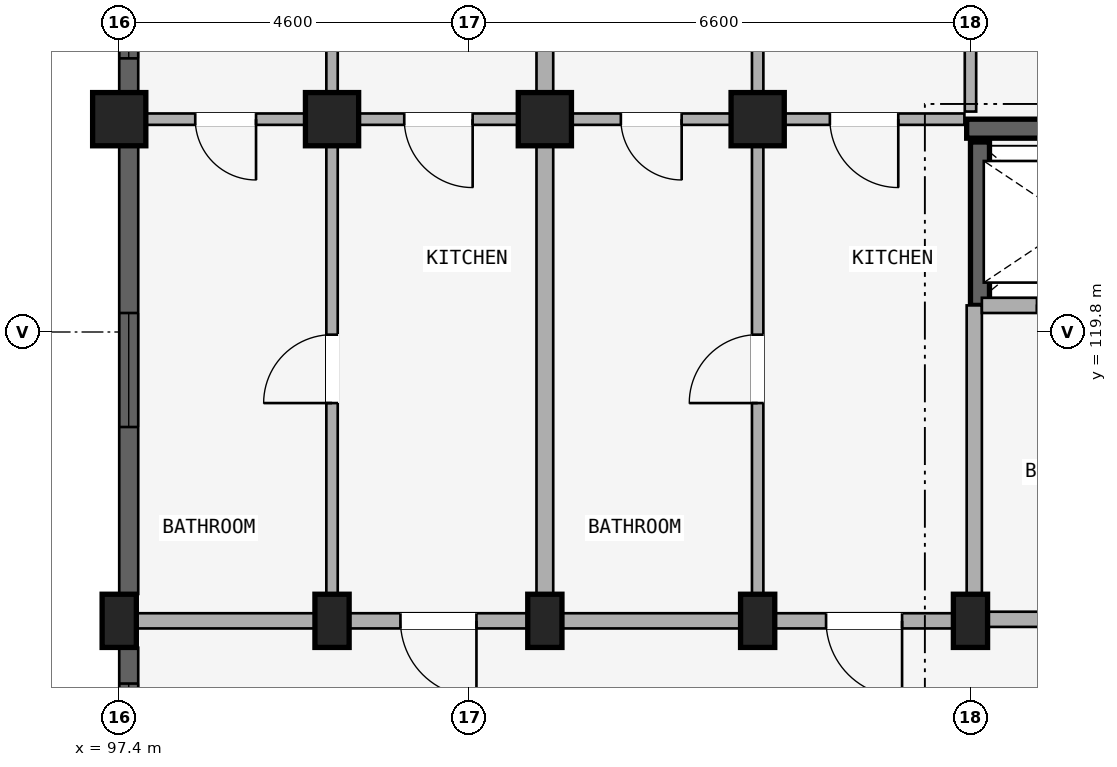
"""IFC4 building model, lengths in metres.
Left out: names, types, materials, properties, quantities, classifications, styles, units other than length and angle.
Written with IfcOpenShell. Run it as: python <this file> out.ifc"""

import sys

from ifc_helpers import new_model, si_unit, direction, frame, frame_2d, origin, origin_2d, place, context, subcontext, project, spatial, rectangle, extrude, element, fill, save


model = new_model("IFC4")
c1 = context("Model", 3, precision=1e-05, world=origin(), true_north=direction((0.0, 1.0)))
c2 = subcontext(c1, "Body", "Model", "MODEL_VIEW")
j1 = project(units=[si_unit("LENGTHUNIT", "METRE"), si_unit("PLANEANGLEUNIT", "RADIAN")], contexts=[c1])
p1 = place(None, origin())
s1 = spatial("IfcSite", under=j1, at=p1, CompositionType="ELEMENT")
p2 = place(p1, origin())
s2 = spatial("IfcBuilding", under=s1, at=p2, CompositionType="ELEMENT")
p3 = place(p2, frame((0.0, 0.0, 18.15)))
s3 = spatial("IfcBuildingStorey", under=s2, at=p3, CompositionType="ELEMENT", Elevation=18.15)
p4 = place(p3, frame((111.35, 122.475, 0.0), z_axis=(0.0, 0.0, 1.0), x_axis=(-1.0, 0.0, 0.0)))
e1 = element("IfcWall", 1, at=p4, inside=s3, PredefinedType="SHEAR", context=c2, shape_type="SweptSolid", body=[
    extrude(rectangle(XDim=2.8, YDim=0.25, at=frame_2d((1.4, 0.0))), origin(), (0.0, 0.0, 1.0), 2.93),
])
p5 = place(p3, frame((108.725, 120.15, 0.0), z_axis=(0.0, 0.0, 1.0), x_axis=(0.0, 1.0, 0.0)))
e2 = element("IfcWall", 2, at=p5, inside=s3, PredefinedType="SHEAR", context=c2, shape_type="SweptSolid", body=[
    extrude(rectangle(XDim=2.15, YDim=0.25, at=frame_2d((1.075, 0.0))), origin(), (0.0, 0.0, 1.0), 2.93),
])
for number, where, z_axis, x_axis in (
    (3, (108.6, 116.0, 0.0), (0.0, 0.0, 1.0), (1.0, 0.0, 0.0)),
    (4, (105.8, 116.0, 0.0), (0.0, 0.0, 1.0), (1.0, 0.0, 0.0)),
):
    element("IfcColumn", number, at=place(p3, frame(where, z_axis=z_axis, x_axis=x_axis)), inside=s3, PredefinedType="COLUMN", context=c2, shape_type="SweptSolid", body=[
        extrude(rectangle(XDim=0.45, YDim=0.7, at=origin_2d()), origin(), (0.0, 0.0, 1.0), 2.93),
    ])
p6 = place(p3, frame((105.8, 122.6, 0.0), z_axis=(0.0, 0.0, 1.0), x_axis=(1.0, 0.0, 0.0)))
e5 = element("IfcColumn", 5, at=p6, inside=s3, PredefinedType="COLUMN", context=c2, shape_type="SweptSolid", body=[
    extrude(rectangle(XDim=0.7, YDim=0.7, at=origin_2d()), origin(), (0.0, 0.0, 1.0), 2.93),
])
p7 = place(p3, frame((103.0, 116.0, 0.0), z_axis=(0.0, 0.0, 1.0), x_axis=(1.0, 0.0, 0.0)))
e6 = element("IfcColumn", 6, at=p7, inside=s3, PredefinedType="COLUMN", context=c2, shape_type="SweptSolid", body=[
    extrude(rectangle(XDim=0.45, YDim=0.7, at=origin_2d()), origin(), (0.0, 0.0, 1.0), 2.93),
])
p8 = place(p3, frame((103.0, 122.6, 0.0), z_axis=(0.0, 0.0, 1.0), x_axis=(1.0, 0.0, 0.0)))
e7 = element("IfcColumn", 7, at=p8, inside=s3, PredefinedType="COLUMN", context=c2, shape_type="SweptSolid", body=[
    extrude(rectangle(XDim=0.7, YDim=0.7, at=origin_2d()), origin(), (0.0, 0.0, 1.0), 2.93),
])
p9 = place(p3, frame((100.2, 116.0, 0.0), z_axis=(0.0, 0.0, 1.0), x_axis=(1.0, 0.0, 0.0)))
e8 = element("IfcColumn", 8, at=p9, inside=s3, PredefinedType="COLUMN", context=c2, shape_type="SweptSolid", body=[
    extrude(rectangle(XDim=0.45, YDim=0.7, at=origin_2d()), origin(), (0.0, 0.0, 1.0), 2.93),
])
p10 = place(p3, frame((100.2, 122.6, 0.0), z_axis=(0.0, 0.0, 1.0), x_axis=(1.0, 0.0, 0.0)))
e9 = element("IfcColumn", 9, at=p10, inside=s3, PredefinedType="COLUMN", context=c2, shape_type="SweptSolid", body=[
    extrude(rectangle(XDim=0.7, YDim=0.7, at=origin_2d()), origin(), (0.0, 0.0, 1.0), 2.93),
])
p11 = place(p3, frame((97.4, 116.0, 0.0), z_axis=(0.0, 0.0, 1.0), x_axis=(1.0, 0.0, 0.0)))
e10 = element("IfcColumn", 10, at=p11, inside=s3, PredefinedType="COLUMN", context=c2, shape_type="SweptSolid", body=[
    extrude(rectangle(XDim=0.45, YDim=0.7, at=origin_2d()), origin(), (0.0, 0.0, 1.0), 2.93),
])
p12 = place(p3, frame((97.4, 122.6, 0.0), z_axis=(0.0, 0.0, 1.0), x_axis=(1.0, 0.0, 0.0)))
e11 = element("IfcColumn", 11, at=p12, inside=s3, PredefinedType="COLUMN", context=c2, shape_type="SweptSolid", body=[
    extrude(rectangle(XDim=0.7, YDim=0.7, at=origin_2d()), origin(), (0.0, 0.0, 1.0), 2.93),
])
p13 = place(p3, frame((114.3, 116.02, 0.0), z_axis=(0.0, 0.0, 1.0), x_axis=(-1.0, 0.0, 0.0)))
e12 = element("IfcWall", 12, at=p13, inside=s3, PredefinedType="STANDARD", context=c2, shape_type="SweptSolid", body=[
    extrude(rectangle(XDim=5.65, YDim=0.2, at=frame_2d((2.825, 0.0))), origin(), (0.0, 0.0, 1.0), 2.372),
])
p14 = place(p13, frame((1.923, 0.0, 0.0)))
e13 = element("IfcOpeningElement", 13, at=p14, cuts=e12, PredefinedType="OPENING", context=c2, shape_type="SweptSolid", body=[
    extrude(rectangle(XDim=1.24, YDim=2.15, at=frame_2d((0.62, 1.075))), frame((0.0, 0.11, 0.0), z_axis=(0.0, -1.0, 0.0), x_axis=(1.0, 0.0, 0.0)), (0.0, 0.0, 1.0), 0.22),
])
p15 = place(p3, frame((108.65, 116.02, 0.0), z_axis=(0.0, 0.0, 1.0), x_axis=(0.0, 1.0, 0.0)))
e14 = element("IfcWall", 14, at=p15, inside=s3, PredefinedType="STANDARD", context=c2, shape_type="SweptSolid", body=[
    extrude(rectangle(XDim=4.13, YDim=0.2, at=frame_2d((2.065, 0.0))), origin(), (0.0, 0.0, 1.0), 2.372),
])
p16 = place(p3, frame((111.3, 120.15, 0.0), z_axis=(0.0, 0.0, 1.0), x_axis=(-1.0, 0.0, 0.0)))
e15 = element("IfcWall", 15, at=p16, inside=s3, PredefinedType="STANDARD", context=c2, shape_type="SweptSolid", body=[
    extrude(rectangle(XDim=2.55, YDim=0.2, at=frame_2d((1.275, 0.0))), origin(), (0.0, 0.0, 1.0), 2.372),
])
p17 = place(p16, frame((0.725, 0.0, 0.0)))
e16 = element("IfcOpeningElement", 16, at=p17, cuts=e15, PredefinedType="OPENING", context=c2, shape_type="SweptSolid", body=[
    extrude(rectangle(XDim=1.1, YDim=2.15, at=frame_2d((0.55, 1.075))), frame((0.0, 0.11, 0.0), z_axis=(0.0, -1.0, 0.0), x_axis=(1.0, 0.0, 0.0)), (0.0, 0.0, 1.0), 0.22),
])
p18 = place(p3, frame((108.6, 116.0, 0.0), z_axis=(0.0, 0.0, 1.0), x_axis=(-1.0, 0.0, 0.0)))
e17 = element("IfcWall", 17, at=p18, inside=s3, PredefinedType="STANDARD", context=c2, shape_type="SweptSolid", body=[
    extrude(rectangle(XDim=2.8, YDim=0.2, at=frame_2d((1.4, 0.0))), origin(), (0.0, 0.0, 1.0), 2.372),
])
p19 = place(p18, frame((0.9, 0.0, 0.0)))
e18 = element("IfcOpeningElement", 18, at=p19, cuts=e17, PredefinedType="OPENING", context=c2, shape_type="SweptSolid", body=[
    extrude(rectangle(XDim=1.0, YDim=2.15, at=frame_2d((0.5, 1.075))), frame((0.0, 0.11, 0.0), z_axis=(0.0, -1.0, 0.0), x_axis=(1.0, 0.0, 0.0)), (0.0, 0.0, 1.0), 0.22),
])
p20 = place(p3, frame((108.52, 122.6, 0.0), z_axis=(0.0, 0.0, 1.0), x_axis=(-1.0, 0.0, 0.0)))
e19 = element("IfcWall", 19, at=p20, inside=s3, PredefinedType="PLUMBINGWALL", context=c2, shape_type="SweptSolid", body=[
    extrude(rectangle(XDim=2.64, YDim=0.15, at=frame_2d((1.32, 0.0))), origin(), (0.0, 0.0, 1.0), 2.372),
])
p21 = place(p20, frame((0.87, 0.0, 0.0)))
e20 = element("IfcOpeningElement", 20, at=p21, cuts=e19, PredefinedType="OPENING", context=c2, shape_type="SweptSolid", body=[
    extrude(rectangle(XDim=0.9, YDim=2.1, at=frame_2d((0.45, 1.05))), frame((0.0, 0.085, 0.0), z_axis=(0.0, -1.0, 0.0), x_axis=(1.0, 0.0, 0.0)), (0.0, 0.0, 1.0), 0.17),
])
p22 = place(p3, frame((105.8, 116.0, 0.0), z_axis=(0.0, 0.0, 1.0), x_axis=(-1.0, 0.0, 0.0)))
e21 = element("IfcWall", 21, at=p22, inside=s3, PredefinedType="STANDARD", context=c2, shape_type="SweptSolid", body=[
    extrude(rectangle(XDim=2.8, YDim=0.2, at=frame_2d((1.4, 0.0))), origin(), (0.0, 0.0, 1.0), 2.372),
])
p23 = place(p3, frame((105.72, 122.6, 0.0), z_axis=(0.0, 0.0, 1.0), x_axis=(-1.0, 0.0, 0.0)))
e22 = element("IfcWall", 22, at=p23, inside=s3, PredefinedType="PLUMBINGWALL", context=c2, shape_type="SweptSolid", body=[
    extrude(rectangle(XDim=2.64, YDim=0.15, at=frame_2d((1.32, 0.0))), origin(), (0.0, 0.0, 1.0), 2.372),
])
p24 = place(p23, frame((0.92, 0.0, 0.0)))
e23 = element("IfcOpeningElement", 23, at=p24, cuts=e22, PredefinedType="OPENING", context=c2, shape_type="SweptSolid", body=[
    extrude(rectangle(XDim=0.8, YDim=2.1, at=frame_2d((0.4, 1.05))), frame((0.0, 0.085, 0.0), z_axis=(0.0, -1.0, 0.0), x_axis=(1.0, 0.0, 0.0)), (0.0, 0.0, 1.0), 0.17),
])
p25 = place(p3, frame((103.0, 116.0, 0.0), z_axis=(0.0, 0.0, 1.0), x_axis=(-1.0, 0.0, 0.0)))
e24 = element("IfcWall", 24, at=p25, inside=s3, PredefinedType="STANDARD", context=c2, shape_type="SweptSolid", body=[
    extrude(rectangle(XDim=2.8, YDim=0.2, at=frame_2d((1.4, 0.0))), origin(), (0.0, 0.0, 1.0), 2.372),
])
p26 = place(p25, frame((0.9, 0.0, 0.0)))
e25 = element("IfcOpeningElement", 25, at=p26, cuts=e24, PredefinedType="OPENING", context=c2, shape_type="SweptSolid", body=[
    extrude(rectangle(XDim=1.0, YDim=2.15, at=frame_2d((0.5, 1.075))), frame((0.0, 0.11, 0.0), z_axis=(0.0, -1.0, 0.0), x_axis=(1.0, 0.0, 0.0)), (0.0, 0.0, 1.0), 0.22),
])
p27 = place(p3, frame((102.92, 122.6, 0.0), z_axis=(0.0, 0.0, 1.0), x_axis=(-1.0, 0.0, 0.0)))
e26 = element("IfcWall", 26, at=p27, inside=s3, PredefinedType="PLUMBINGWALL", context=c2, shape_type="SweptSolid", body=[
    extrude(rectangle(XDim=2.64, YDim=0.15, at=frame_2d((1.32, 0.0))), origin(), (0.0, 0.0, 1.0), 2.372),
])
p28 = place(p27, frame((0.87, 0.0, 0.0)))
e27 = element("IfcOpeningElement", 27, at=p28, cuts=e26, PredefinedType="OPENING", context=c2, shape_type="SweptSolid", body=[
    extrude(rectangle(XDim=0.9, YDim=2.1, at=frame_2d((0.45, 1.05))), frame((0.0, 0.085, 0.0), z_axis=(0.0, -1.0, 0.0), x_axis=(1.0, 0.0, 0.0)), (0.0, 0.0, 1.0), 0.17),
])
p29 = place(p3, frame((100.2, 116.0, 0.0), z_axis=(0.0, 0.0, 1.0), x_axis=(-1.0, 0.0, 0.0)))
e28 = element("IfcWall", 28, at=p29, inside=s3, PredefinedType="STANDARD", context=c2, shape_type="SweptSolid", body=[
    extrude(rectangle(XDim=2.8, YDim=0.2, at=frame_2d((1.4, 0.0))), origin(), (0.0, 0.0, 1.0), 2.372),
])
p30 = place(p3, frame((100.12, 122.6, 0.0), z_axis=(0.0, 0.0, 1.0), x_axis=(-1.0, 0.0, 0.0)))
e29 = element("IfcWall", 29, at=p30, inside=s3, PredefinedType="PLUMBINGWALL", context=c2, shape_type="SweptSolid", body=[
    extrude(rectangle(XDim=2.64, YDim=0.15, at=frame_2d((1.32, 0.0))), origin(), (0.0, 0.0, 1.0), 2.372),
])
p31 = place(p30, frame((0.92, 0.0, 0.0)))
e30 = element("IfcOpeningElement", 30, at=p31, cuts=e29, PredefinedType="OPENING", context=c2, shape_type="SweptSolid", body=[
    extrude(rectangle(XDim=0.8, YDim=2.1, at=frame_2d((0.4, 1.05))), frame((0.0, 0.085, 0.0), z_axis=(0.0, -1.0, 0.0), x_axis=(1.0, 0.0, 0.0)), (0.0, 0.0, 1.0), 0.17),
])
p32 = place(p3, frame((108.6, 122.7, 0.0), z_axis=(0.0, 0.0, 1.0), x_axis=(0.0, 1.0, 0.0)))
e31 = element("IfcWall", 31, at=p32, inside=s3, PredefinedType="PARTITIONING", context=c2, shape_type="SweptSolid", body=[
    extrude(rectangle(XDim=10.82, YDim=0.15, at=frame_2d((5.41, 0.0))), origin(), (0.0, 0.0, 1.0), 2.372),
])
p33 = place(p32, frame((0.899, 0.0, 0.0)))
e32 = element("IfcOpeningElement", 32, at=p33, cuts=e31, PredefinedType="OPENING", context=c2, shape_type="SweptSolid", body=[
    extrude(rectangle(XDim=0.8, YDim=2.1, at=frame_2d((0.4, 1.05))), frame((0.0, 0.085, 0.0), z_axis=(0.0, -1.0, 0.0), x_axis=(1.0, 0.0, 0.0)), (0.0, 0.0, 1.0), 0.17),
])
p34 = place(p3, frame((105.8, 116.05, 0.0), z_axis=(0.0, 0.0, 1.0), x_axis=(0.0, 1.0, 0.0)))
e33 = element("IfcWall", 33, at=p34, inside=s3, PredefinedType="PARTITIONING", context=c2, shape_type="SweptSolid", body=[
    extrude(rectangle(XDim=6.53, YDim=0.15, at=frame_2d((3.265, 0.0))), origin(), (0.0, 0.0, 1.0), 2.372),
])
p35 = place(p34, frame((2.815, 0.0, 0.0)))
e34 = element("IfcOpeningElement", 34, at=p35, cuts=e33, PredefinedType="OPENING", context=c2, shape_type="SweptSolid", body=[
    extrude(rectangle(XDim=0.9, YDim=2.1, at=frame_2d((0.45, 1.05))), frame((0.0, 0.085, 0.0), z_axis=(0.0, -1.0, 0.0), x_axis=(1.0, 0.0, 0.0)), (0.0, 0.0, 1.0), 0.17),
])
p36 = place(p3, frame((105.8, 122.7, 0.0), z_axis=(0.0, 0.0, 1.0), x_axis=(0.0, 1.0, 0.0)))
e35 = element("IfcWall", 35, at=p36, inside=s3, PredefinedType="PARTITIONING", context=c2, shape_type="SweptSolid", body=[
    extrude(rectangle(XDim=10.82, YDim=0.15, at=frame_2d((5.41, 0.0))), origin(), (0.0, 0.0, 1.0), 2.372),
])
p37 = place(p36, frame((0.899, 0.0, 0.0)))
e36 = element("IfcOpeningElement", 36, at=p37, cuts=e35, PredefinedType="OPENING", context=c2, shape_type="SweptSolid", body=[
    extrude(rectangle(XDim=0.8, YDim=2.1, at=frame_2d((0.4, 1.05))), frame((0.0, 0.085, 0.0), z_axis=(0.0, -1.0, 0.0), x_axis=(1.0, 0.0, 0.0)), (0.0, 0.0, 1.0), 0.17),
])
p38 = place(p3, frame((103.0, 116.05, 0.0), z_axis=(0.0, 0.0, 1.0), x_axis=(0.0, 1.0, 0.0)))
e37 = element("IfcWall", 37, at=p38, inside=s3, PredefinedType="STANDARD", context=c2, shape_type="SweptSolid", body=[
    extrude(rectangle(XDim=6.53, YDim=0.22, at=frame_2d((3.265, 0.0))), origin(), (0.0, 0.0, 1.0), 2.372),
])
p39 = place(p3, frame((103.0, 122.7, 0.0), z_axis=(0.0, 0.0, 1.0), x_axis=(0.0, 1.0, 0.0)))
e38 = element("IfcWall", 38, at=p39, inside=s3, PredefinedType="STANDARD", context=c2, shape_type="SweptSolid", body=[
    extrude(rectangle(XDim=10.82, YDim=0.22, at=frame_2d((5.41, 0.0))), origin(), (0.0, 0.0, 1.0), 2.372),
])
p40 = place(p3, frame((100.2, 116.05, 0.0), z_axis=(0.0, 0.0, 1.0), x_axis=(0.0, 1.0, 0.0)))
e39 = element("IfcWall", 39, at=p40, inside=s3, PredefinedType="PARTITIONING", context=c2, shape_type="SweptSolid", body=[
    extrude(rectangle(XDim=6.53, YDim=0.15, at=frame_2d((3.265, 0.0))), origin(), (0.0, 0.0, 1.0), 2.372),
])
p41 = place(p40, frame((2.815, 0.0, 0.0)))
e40 = element("IfcOpeningElement", 40, at=p41, cuts=e39, PredefinedType="OPENING", context=c2, shape_type="SweptSolid", body=[
    extrude(rectangle(XDim=0.9, YDim=2.1, at=frame_2d((0.45, 1.05))), frame((0.0, 0.085, 0.0), z_axis=(0.0, -1.0, 0.0), x_axis=(1.0, 0.0, 0.0)), (0.0, 0.0, 1.0), 0.17),
])
p42 = place(p3, frame((100.2, 122.7, 0.0), z_axis=(0.0, 0.0, 1.0), x_axis=(0.0, 1.0, 0.0)))
e41 = element("IfcWall", 41, at=p42, inside=s3, PredefinedType="PARTITIONING", context=c2, shape_type="SweptSolid", body=[
    extrude(rectangle(XDim=10.82, YDim=0.15, at=frame_2d((5.41, 0.0))), origin(), (0.0, 0.0, 1.0), 2.372),
])
p43 = place(p42, frame((0.899, 0.0, 0.0)))
e42 = element("IfcOpeningElement", 42, at=p43, cuts=e41, PredefinedType="OPENING", context=c2, shape_type="SweptSolid", body=[
    extrude(rectangle(XDim=0.8, YDim=2.1, at=frame_2d((0.4, 1.05))), frame((0.0, 0.085, 0.0), z_axis=(0.0, -1.0, 0.0), x_axis=(1.0, 0.0, 0.0)), (0.0, 0.0, 1.0), 0.17),
])
p44 = place(p3, frame((97.525, 113.954, 0.0), z_axis=(0.0, 0.0, 1.0), x_axis=(0.0, 1.0, 0.0)))
e43 = element("IfcWall", 43, at=p44, inside=s3, PredefinedType="STANDARD", context=c2, shape_type="SweptSolid", body=[
    extrude(rectangle(XDim=1.693, YDim=0.25, at=frame_2d((0.846, 0.0))), origin(), (0.0, 0.0, 1.0), 2.372),
])
p45 = place(p44, frame((0.471, 0.0, 0.88)))
e44 = element("IfcOpeningElement", 44, at=p45, cuts=e43, PredefinedType="OPENING", context=c2, shape_type="SweptSolid", body=[
    extrude(rectangle(XDim=0.75, YDim=1.05, at=frame_2d((0.375, 0.525))), frame((0.0, 0.135, 0.0), z_axis=(0.0, -1.0, 0.0), x_axis=(1.0, 0.0, 0.0)), (0.0, 0.0, 1.0), 0.27),
])
p46 = place(p3, frame((97.525, 116.354, 0.0), z_axis=(0.0, 0.0, 1.0), x_axis=(0.0, 1.0, 0.0)))
e45 = element("IfcWall", 45, at=p46, inside=s3, PredefinedType="STANDARD", context=c2, shape_type="SweptSolid", body=[
    extrude(rectangle(XDim=5.893, YDim=0.25, at=frame_2d((2.947, 0.0))), origin(), (0.0, 0.0, 1.0), 2.372),
])
p47 = place(p46, frame((2.197, 0.0, 0.522)))
e46 = element("IfcOpeningElement", 46, at=p47, cuts=e45, PredefinedType="OPENING", context=c2, shape_type="SweptSolid", body=[
    extrude(rectangle(XDim=1.5, YDim=1.65, at=frame_2d((0.75, 0.825))), frame((0.0, 0.135, 0.0), z_axis=(0.0, -1.0, 0.0), x_axis=(1.0, 0.0, 0.0)), (0.0, 0.0, 1.0), 0.27),
])
p48 = place(p3, frame((97.525, 122.954, 0.0), z_axis=(0.0, 0.0, 1.0), x_axis=(0.0, 1.0, 0.0)))
e47 = element("IfcWall", 47, at=p48, inside=s3, PredefinedType="STANDARD", context=c2, shape_type="SweptSolid", body=[
    extrude(rectangle(XDim=2.093, YDim=0.25, at=frame_2d((1.046, 0.0))), origin(), (0.0, 0.0, 1.0), 2.372),
])
p49 = place(p48, frame((0.447, 0.0, 0.672)))
e48 = element("IfcOpeningElement", 48, at=p49, cuts=e47, PredefinedType="OPENING", context=c2, shape_type="SweptSolid", body=[
    extrude(rectangle(XDim=1.2, YDim=1.5, at=frame_2d((0.6, 0.75))), frame((0.0, 0.135, 0.0), z_axis=(0.0, -1.0, 0.0), x_axis=(1.0, 0.0, 0.0)), (0.0, 0.0, 1.0), 0.27),
])
p50 = place(p45, origin())
e49 = element("IfcWindow", 49, at=p50, inside=s3, PartitioningType="SINGLE_PANEL", PredefinedType="WINDOW", context=c2, shape_type="SweptSolid", body=[
    extrude(rectangle(XDim=0.75, YDim=1.05, at=frame_2d((0.375, 0.525))), frame((0.0, 0.03, 0.0), z_axis=(0.0, -1.0, 0.0), x_axis=(1.0, 0.0, 0.0)), (0.0, 0.0, 1.0), 0.06),
])
fill(e44, e49)
p51 = place(p47, origin())
e50 = element("IfcWindow", 50, at=p51, inside=s3, PartitioningType="DOUBLE_PANEL_VERTICAL", PredefinedType="WINDOW", context=c2, shape_type="SweptSolid", body=[
    extrude(rectangle(XDim=1.5, YDim=1.65, at=frame_2d((0.75, 0.825))), frame((0.0, 0.03, 0.0), z_axis=(0.0, -1.0, 0.0), x_axis=(1.0, 0.0, 0.0)), (0.0, 0.0, 1.0), 0.06),
])
fill(e46, e50)
p52 = place(p49, origin())
e51 = element("IfcWindow", 51, at=p52, inside=s3, PartitioningType="SINGLE_PANEL", PredefinedType="WINDOW", context=c2, shape_type="SweptSolid", body=[
    extrude(rectangle(XDim=1.2, YDim=1.5, at=frame_2d((0.6, 0.75))), frame((0.0, 0.03, 0.0), z_axis=(0.0, -1.0, 0.0), x_axis=(1.0, 0.0, 0.0)), (0.0, 0.0, 1.0), 0.06),
])
fill(e48, e51)
p53 = place(p17, origin())
e52 = element("IfcDoor", 52, at=p53, inside=s3, OperationType="SLIDING_TO_LEFT", PredefinedType="DOOR", context=c2, shape_type="SweptSolid", body=[
    extrude(rectangle(XDim=1.1, YDim=2.15, at=frame_2d((0.55, 1.075))), frame((0.0, 0.025, 0.0), z_axis=(0.0, -1.0, 0.0), x_axis=(1.0, 0.0, 0.0)), (0.0, 0.0, 1.0), 0.05),
])
fill(e16, e52)
p54 = place(p21, frame((0.9, 0.0, 0.0), z_axis=(0.0, 0.0, 1.0), x_axis=(-1.0, 0.0, 0.0)))
e53 = element("IfcDoor", 53, at=p54, inside=s3, OperationType="SINGLE_SWING_RIGHT", PredefinedType="DOOR", context=c2, shape_type="SweptSolid", body=[
    extrude(rectangle(XDim=0.9, YDim=2.1, at=frame_2d((0.45, 1.05))), frame((0.0, 0.025, 0.0), z_axis=(0.0, -1.0, 0.0), x_axis=(1.0, 0.0, 0.0)), (0.0, 0.0, 1.0), 0.05),
])
fill(e20, e53)
p55 = place(p19, origin())
e54 = element("IfcDoor", 54, at=p55, inside=s3, OperationType="SINGLE_SWING_LEFT", PredefinedType="DOOR", context=c2, shape_type="SweptSolid", body=[
    extrude(rectangle(XDim=1.0, YDim=2.15, at=frame_2d((0.5, 1.075))), frame((0.0, 0.025, 0.0), z_axis=(0.0, -1.0, 0.0), x_axis=(1.0, 0.0, 0.0)), (0.0, 0.0, 1.0), 0.05),
])
fill(e18, e54)
p56 = place(p24, frame((0.8, 0.0, 0.0), z_axis=(0.0, 0.0, 1.0), x_axis=(-1.0, 0.0, 0.0)))
e55 = element("IfcDoor", 55, at=p56, inside=s3, OperationType="SINGLE_SWING_RIGHT", PredefinedType="DOOR", context=c2, shape_type="SweptSolid", body=[
    extrude(rectangle(XDim=0.8, YDim=2.1, at=frame_2d((0.4, 1.05))), frame((0.0, 0.025, 0.0), z_axis=(0.0, -1.0, 0.0), x_axis=(1.0, 0.0, 0.0)), (0.0, 0.0, 1.0), 0.05),
])
fill(e23, e55)
p57 = place(p28, frame((0.9, 0.0, 0.0), z_axis=(0.0, 0.0, 1.0), x_axis=(-1.0, 0.0, 0.0)))
e56 = element("IfcDoor", 56, at=p57, inside=s3, OperationType="SINGLE_SWING_RIGHT", PredefinedType="DOOR", context=c2, shape_type="SweptSolid", body=[
    extrude(rectangle(XDim=0.9, YDim=2.1, at=frame_2d((0.45, 1.05))), frame((0.0, 0.025, 0.0), z_axis=(0.0, -1.0, 0.0), x_axis=(1.0, 0.0, 0.0)), (0.0, 0.0, 1.0), 0.05),
])
fill(e27, e56)
p58 = place(p26, origin())
e57 = element("IfcDoor", 57, at=p58, inside=s3, OperationType="SINGLE_SWING_LEFT", PredefinedType="DOOR", context=c2, shape_type="SweptSolid", body=[
    extrude(rectangle(XDim=1.0, YDim=2.15, at=frame_2d((0.5, 1.075))), frame((0.0, 0.025, 0.0), z_axis=(0.0, -1.0, 0.0), x_axis=(1.0, 0.0, 0.0)), (0.0, 0.0, 1.0), 0.05),
])
fill(e25, e57)
p59 = place(p31, frame((0.8, 0.0, 0.0), z_axis=(0.0, 0.0, 1.0), x_axis=(-1.0, 0.0, 0.0)))
e58 = element("IfcDoor", 58, at=p59, inside=s3, OperationType="SINGLE_SWING_RIGHT", PredefinedType="DOOR", context=c2, shape_type="SweptSolid", body=[
    extrude(rectangle(XDim=0.8, YDim=2.1, at=frame_2d((0.4, 1.05))), frame((0.0, 0.025, 0.0), z_axis=(0.0, -1.0, 0.0), x_axis=(1.0, 0.0, 0.0)), (0.0, 0.0, 1.0), 0.05),
])
fill(e30, e58)
p60 = place(p35, origin())
e59 = element("IfcDoor", 59, at=p60, inside=s3, OperationType="SINGLE_SWING_LEFT", PredefinedType="DOOR", context=c2, shape_type="SweptSolid", body=[
    extrude(rectangle(XDim=0.9, YDim=2.1, at=frame_2d((0.45, 1.05))), frame((0.0, 0.025, 0.0), z_axis=(0.0, -1.0, 0.0), x_axis=(1.0, 0.0, 0.0)), (0.0, 0.0, 1.0), 0.05),
])
fill(e34, e59)
p61 = place(p41, frame((0.9, 0.0, 0.0), z_axis=(0.0, 0.0, 1.0), x_axis=(-1.0, 0.0, 0.0)))
e60 = element("IfcDoor", 60, at=p61, inside=s3, OperationType="SINGLE_SWING_RIGHT", PredefinedType="DOOR", context=c2, shape_type="SweptSolid", body=[
    extrude(rectangle(XDim=0.9, YDim=2.1, at=frame_2d((0.45, 1.05))), frame((0.0, 0.025, 0.0), z_axis=(0.0, -1.0, 0.0), x_axis=(1.0, 0.0, 0.0)), (0.0, 0.0, 1.0), 0.05),
])
fill(e40, e60)
save(model, sys.argv[1])
